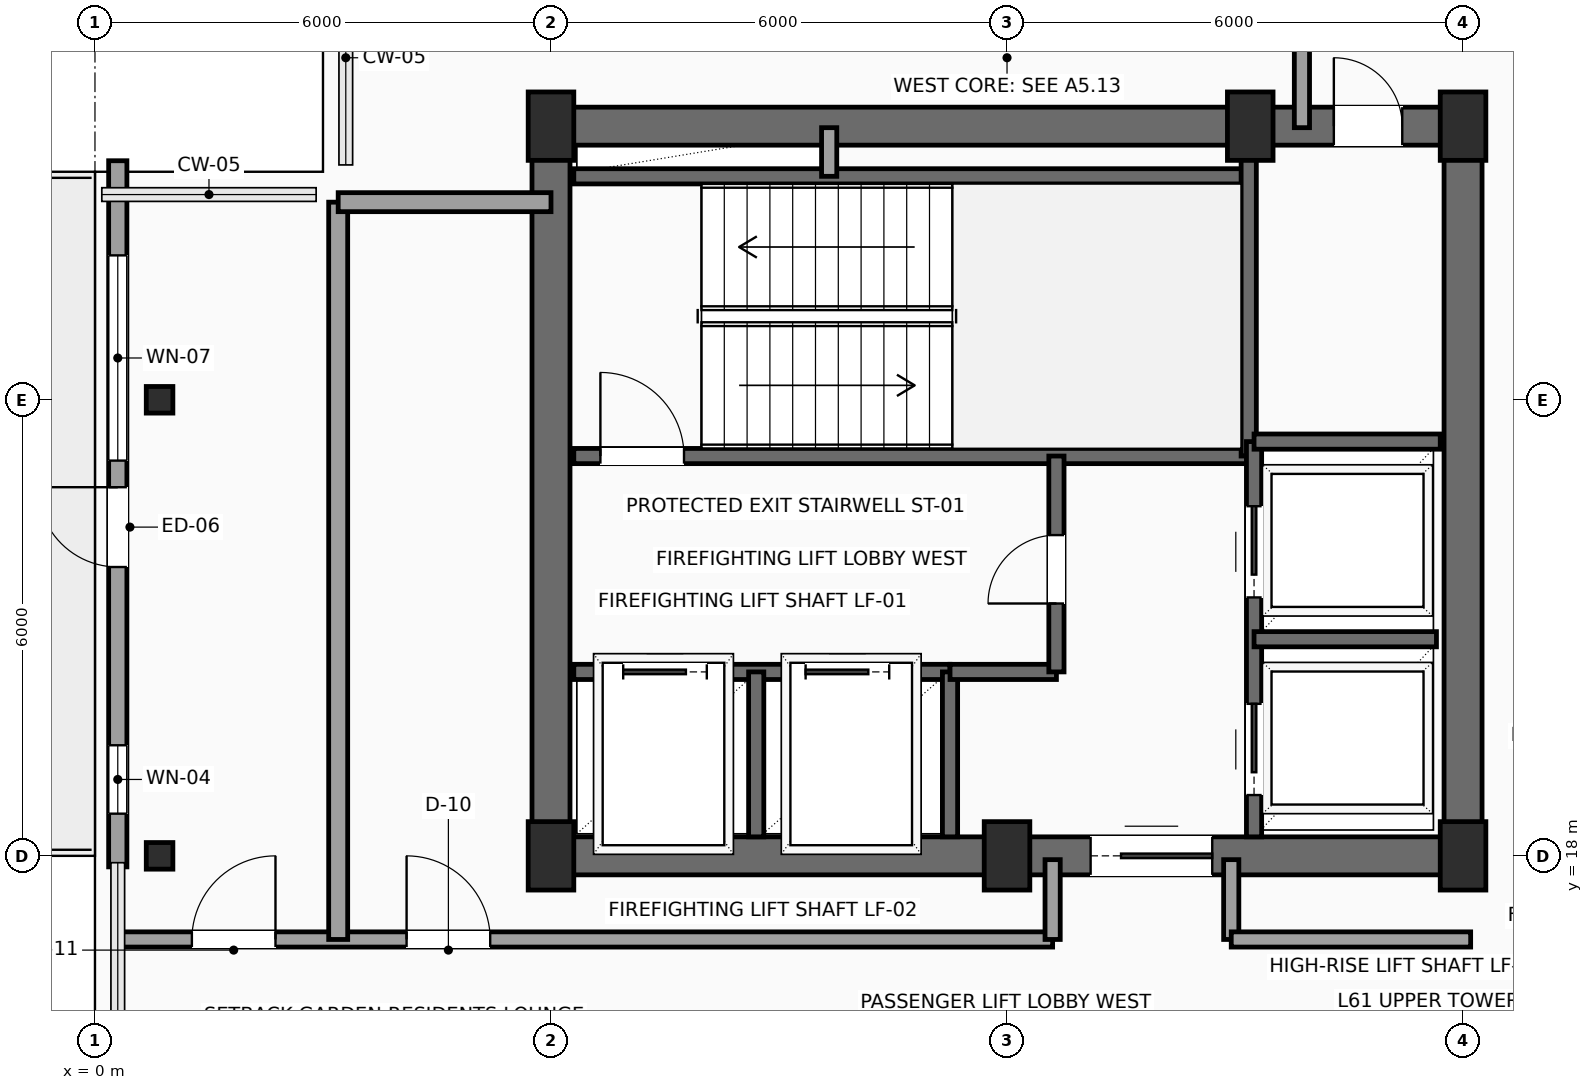
"""IFC4 building model, lengths in metres.
Left out: names, types, materials, properties, quantities, classifications, styles, units other than length and angle.
Written with IfcOpenShell. Run it as: python <this file> out.ifc"""

import sys

from ifc_helpers import new_model, si_unit, direction, frame, frame_2d, origin, origin_2d, place, context, subcontext, project, spatial, rectangle, hollow_rectangle, extrude, element, fill, save


model = new_model("IFC4")
c1 = context("Model", 3, precision=1e-05, world=origin(), true_north=direction((0.0, 1.0)))
c2 = subcontext(c1, "Body", "Model", "MODEL_VIEW")
j1 = project(units=[si_unit("LENGTHUNIT", "METRE"), si_unit("PLANEANGLEUNIT", "RADIAN")], contexts=[c1])
p1 = place(None, origin())
s1 = spatial("IfcSite", under=j1, at=p1, CompositionType="ELEMENT")
p2 = place(p1, origin())
s2 = spatial("IfcBuilding", under=s1, at=p2, CompositionType="ELEMENT")
p3 = place(p2, frame((0.0, 0.0, 246.7)))
s3 = spatial("IfcBuildingStorey", under=s2, at=p3, CompositionType="ELEMENT", Elevation=246.7)
for number, where, z_axis, x_axis in (
    (1, (6.0, 18.0, 0.0), (0.0, 0.0, 1.0), (1.0, 0.0, 0.0)),
    (2, (12.0, 18.0, 0.0), (0.0, 0.0, 1.0), (1.0, 0.0, 0.0)),
    (3, (18.0, 18.0, 0.0), (0.0, 0.0, 1.0), (1.0, 0.0, 0.0)),
    (4, (6.0, 27.6, 0.0), (0.0, 0.0, 1.0), (1.0, 0.0, 0.0)),
    (5, (15.2, 27.6, 0.0), (0.0, 0.0, 1.0), (1.0, 0.0, 0.0)),
    (6, (18.0, 27.6, 0.0), (0.0, 0.0, 1.0), (1.0, 0.0, 0.0)),
):
    element("IfcColumn", number, at=place(p3, frame(where, z_axis=z_axis, x_axis=x_axis)), inside=s3, PredefinedType="COLUMN", context=c2, shape_type="SweptSolid", body=[
        extrude(rectangle(XDim=0.6, YDim=0.9, at=origin_2d()), origin(), (0.0, 0.0, 1.0), 3.5),
    ])
for number, where, z_axis, x_axis in (
    (7, (0.85, 18.0, 0.0), (0.0, 0.0, 1.0), (1.0, 0.0, 0.0)),
    (8, (0.85, 24.0, 0.0), (0.0, 0.0, 1.0), (1.0, 0.0, 0.0)),
):
    element("IfcColumn", number, at=place(p3, frame(where, z_axis=z_axis, x_axis=x_axis)), inside=s3, PredefinedType="COLUMN", context=c2, shape_type="SweptSolid", body=[
        extrude(hollow_rectangle(XDim=0.35, YDim=0.35, WallThickness=0.016, InnerFilletRadius=0.016, OuterFilletRadius=0.032, at=origin_2d()), origin(), (0.0, 0.0, 1.0), 3.5),
    ])
p4 = place(p3, frame((0.3, 17.855, 0.0), z_axis=(0.0, 0.0, 1.0), x_axis=(0.0, 1.0, 0.0)))
e9 = element("IfcWall", 9, at=p4, inside=s3, PredefinedType="SOLIDWALL", context=c2, shape_type="SweptSolid", body=[
    extrude(rectangle(XDim=9.29, YDim=0.24, at=frame_2d((4.645, 0.0))), origin(), (0.0, 0.0, 1.0), 3.3),
])
p5 = place(p4, frame((3.945, 0.0, 0.0)))
e10 = element("IfcOpeningElement", 10, at=p5, cuts=e9, PredefinedType="OPENING", context=c2, shape_type="SweptSolid", body=[
    extrude(rectangle(XDim=1.05, YDim=2.2, at=frame_2d((0.525, 1.1))), frame((0.0, 0.13, 0.0), z_axis=(0.0, -1.0, 0.0), x_axis=(1.0, 0.0, 0.0)), (0.0, 0.0, 1.0), 0.26),
])
p6 = place(p4, frame((5.345, 0.0, 0.6)))
e11 = element("IfcOpeningElement", 11, at=p6, cuts=e9, PredefinedType="OPENING", context=c2, shape_type="SweptSolid", body=[
    extrude(rectangle(XDim=2.7, YDim=2.3, at=frame_2d((1.35, 1.15))), frame((0.0, 0.13, 0.0), z_axis=(0.0, -1.0, 0.0), x_axis=(1.0, 0.0, 0.0)), (0.0, 0.0, 1.0), 0.26),
])
p7 = place(p4, frame((0.7, 0.0, 0.6)))
e12 = element("IfcOpeningElement", 12, at=p7, cuts=e9, PredefinedType="OPENING", context=c2, shape_type="SweptSolid", body=[
    extrude(rectangle(XDim=0.9, YDim=2.2, at=frame_2d((0.45, 1.1))), frame((0.0, 0.13, 0.0), z_axis=(0.0, -1.0, 0.0), x_axis=(1.0, 0.0, 0.0)), (0.0, 0.0, 1.0), 0.26),
])
p8 = place(p3, frame((6.0, 18.0, 0.0), z_axis=(0.0, 0.0, 1.0), x_axis=(1.0, 0.0, 0.0)))
e13 = element("IfcWall", 13, at=p8, inside=s3, PredefinedType="SHEAR", context=c2, shape_type="SweptSolid", body=[
    extrude(rectangle(XDim=12.0, YDim=0.5, at=frame_2d((6.0, 0.0))), origin(), (0.0, 0.0, 1.0), 3.3),
])
p9 = place(p8, frame((7.1, 0.0, 0.0)))
e14 = element("IfcOpeningElement", 14, at=p9, cuts=e13, PredefinedType="OPENING", context=c2, shape_type="SweptSolid", body=[
    extrude(rectangle(XDim=1.6, YDim=2.3, at=frame_2d((0.8, 1.15))), frame((0.0, 0.26, 0.0), z_axis=(0.0, -1.0, 0.0), x_axis=(1.0, 0.0, 0.0)), (0.0, 0.0, 1.0), 0.52),
])
p10 = place(p3, frame((6.0, 27.6, 0.0), z_axis=(0.0, 0.0, 1.0), x_axis=(1.0, 0.0, 0.0)))
e15 = element("IfcWall", 15, at=p10, inside=s3, PredefinedType="SHEAR", context=c2, shape_type="SweptSolid", body=[
    extrude(rectangle(XDim=12.0, YDim=0.5, at=frame_2d((6.0, 0.0))), origin(), (0.0, 0.0, 1.0), 3.3),
])
p11 = place(p10, frame((10.3, 0.0, 0.0)))
e16 = element("IfcOpeningElement", 16, at=p11, cuts=e15, PredefinedType="OPENING", context=c2, shape_type="SweptSolid", body=[
    extrude(rectangle(XDim=0.9, YDim=2.15, at=frame_2d((0.45, 1.075))), frame((0.0, 0.26, 0.0), z_axis=(0.0, -1.0, 0.0), x_axis=(1.0, 0.0, 0.0)), (0.0, 0.0, 1.0), 0.52),
])
for number, where, z_axis, x_axis in (
    (17, (6.0, 18.0, 0.0), (0.0, 0.0, 1.0), (0.0, 1.0, 0.0)),
    (18, (18.0, 18.0, 0.0), (0.0, 0.0, 1.0), (0.0, 1.0, 0.0)),
):
    element("IfcWall", number, at=place(p3, frame(where, z_axis=z_axis, x_axis=x_axis)), inside=s3, PredefinedType="SHEAR", context=c2, shape_type="SweptSolid", body=[
        extrude(rectangle(XDim=9.6, YDim=0.5, at=frame_2d((4.8, 0.0))), origin(), (0.0, 0.0, 1.0), 3.3),
    ])
p12 = place(p3, frame((6.3, 23.26, 0.0), z_axis=(0.0, 0.0, 1.0), x_axis=(1.0, 0.0, 0.0)))
e19 = element("IfcWall", 19, at=p12, inside=s3, PredefinedType="SHEAR", context=c2, shape_type="SweptSolid", body=[
    extrude(rectangle(XDim=8.88, YDim=0.2, at=frame_2d((4.44, 0.0))), origin(), (0.0, 0.0, 1.0), 3.3),
])
p13 = place(p12, frame((0.35, 0.0, 0.0)))
e20 = element("IfcOpeningElement", 20, at=p13, cuts=e19, PredefinedType="OPENING", context=c2, shape_type="SweptSolid", body=[
    extrude(rectangle(XDim=1.1, YDim=2.2, at=frame_2d((0.55, 1.1))), frame((0.0, 0.11, 0.0), z_axis=(0.0, -1.0, 0.0), x_axis=(1.0, 0.0, 0.0)), (0.0, 0.0, 1.0), 0.22),
])
p14 = place(p3, frame((6.3, 26.94, 0.0), z_axis=(0.0, 0.0, 1.0), x_axis=(1.0, 0.0, 0.0)))
e21 = element("IfcWall", 21, at=p14, inside=s3, PredefinedType="SHEAR", context=c2, shape_type="SweptSolid", body=[
    extrude(rectangle(XDim=8.88, YDim=0.2, at=frame_2d((4.44, 0.0))), origin(), (0.0, 0.0, 1.0), 3.3),
])
p15 = place(p3, frame((15.18, 23.26, 0.0), z_axis=(0.0, 0.0, 1.0), x_axis=(0.0, 1.0, 0.0)))
e22 = element("IfcWall", 22, at=p15, inside=s3, PredefinedType="SHEAR", context=c2, shape_type="SweptSolid", body=[
    extrude(rectangle(XDim=4.04, YDim=0.2, at=frame_2d((2.02, 0.0))), origin(), (0.0, 0.0, 1.0), 3.3),
])
p16 = place(p3, frame((6.3, 20.42, 0.0), z_axis=(0.0, 0.0, 1.0), x_axis=(1.0, 0.0, 0.0)))
e23 = element("IfcWall", 23, at=p16, inside=s3, PredefinedType="SHEAR", context=c2, shape_type="SweptSolid", body=[
    extrude(rectangle(XDim=4.95, YDim=0.2, at=frame_2d((2.475, 0.0))), origin(), (0.0, 0.0, 1.0), 3.3),
])
p17 = place(p16, frame((0.65, 0.0, 0.0)))
e24 = element("IfcOpeningElement", 24, at=p17, cuts=e23, PredefinedType="OPENING", context=c2, shape_type="SweptSolid", body=[
    extrude(rectangle(XDim=1.1, YDim=2.2, at=frame_2d((0.55, 1.1))), frame((0.0, 0.11, 0.0), z_axis=(0.0, -1.0, 0.0), x_axis=(1.0, 0.0, 0.0)), (0.0, 0.0, 1.0), 0.22),
])
p18 = place(p16, frame((3.05, 0.0, 0.0)))
e25 = element("IfcOpeningElement", 25, at=p18, cuts=e23, PredefinedType="OPENING", context=c2, shape_type="SweptSolid", body=[
    extrude(rectangle(XDim=1.1, YDim=2.2, at=frame_2d((0.55, 1.1))), frame((0.0, 0.11, 0.0), z_axis=(0.0, -1.0, 0.0), x_axis=(1.0, 0.0, 0.0)), (0.0, 0.0, 1.0), 0.22),
])
for number, where, z_axis, x_axis in (
    (26, (8.7, 18.25, 0.0), (0.0, 0.0, 1.0), (0.0, 1.0, 0.0)),
    (27, (11.25, 18.25, 0.0), (0.0, 0.0, 1.0), (0.0, 1.0, 0.0)),
):
    element("IfcWall", number, at=place(p3, frame(where, z_axis=z_axis, x_axis=x_axis)), inside=s3, PredefinedType="SHEAR", context=c2, shape_type="SweptSolid", body=[
        extrude(rectangle(XDim=2.17, YDim=0.2, at=frame_2d((1.085, 0.0))), origin(), (0.0, 0.0, 1.0), 3.3),
    ])
p19 = place(p3, frame((11.25, 20.42, 0.0), z_axis=(0.0, 0.0, 1.0), x_axis=(1.0, 0.0, 0.0)))
e28 = element("IfcWall", 28, at=p19, inside=s3, PredefinedType="SHEAR", context=c2, shape_type="SweptSolid", body=[
    extrude(rectangle(XDim=1.4, YDim=0.2, at=frame_2d((0.7, 0.0))), origin(), (0.0, 0.0, 1.0), 3.3),
])
p20 = place(p3, frame((12.65, 20.42, 0.0), z_axis=(0.0, 0.0, 1.0), x_axis=(0.0, 1.0, 0.0)))
e29 = element("IfcWall", 29, at=p20, inside=s3, PredefinedType="SHEAR", context=c2, shape_type="SweptSolid", body=[
    extrude(rectangle(XDim=2.84, YDim=0.2, at=frame_2d((1.42, 0.0))), origin(), (0.0, 0.0, 1.0), 3.3),
])
p21 = place(p20, frame((0.9, 0.0, 0.0)))
e30 = element("IfcOpeningElement", 30, at=p21, cuts=e29, PredefinedType="OPENING", context=c2, shape_type="SweptSolid", body=[
    extrude(rectangle(XDim=0.9, YDim=2.15, at=frame_2d((0.45, 1.075))), frame((0.0, 0.11, 0.0), z_axis=(0.0, -1.0, 0.0), x_axis=(1.0, 0.0, 0.0)), (0.0, 0.0, 1.0), 0.22),
])
p22 = place(p3, frame((9.66, 26.94, 0.0), z_axis=(0.0, 0.0, 1.0), x_axis=(0.0, 1.0, 0.0)))
e31 = element("IfcWall", 31, at=p22, inside=s3, PredefinedType="SOLIDWALL", context=c2, shape_type="SweptSolid", body=[
    extrude(rectangle(XDim=0.64, YDim=0.2, at=frame_2d((0.32, 0.0))), origin(), (0.0, 0.0, 1.0), 3.3),
])
p23 = place(p3, frame((15.25, 18.25, 0.0), z_axis=(0.0, 0.0, 1.0), x_axis=(0.0, 1.0, 0.0)))
e32 = element("IfcWall", 32, at=p23, inside=s3, PredefinedType="SHEAR", context=c2, shape_type="SweptSolid", body=[
    extrude(rectangle(XDim=5.2, YDim=0.2, at=frame_2d((2.6, 0.0))), origin(), (0.0, 0.0, 1.0), 3.3),
])
p24 = place(p23, frame((0.55, 0.0, 0.0)))
e33 = element("IfcOpeningElement", 33, at=p24, cuts=e32, PredefinedType="OPENING", context=c2, shape_type="SweptSolid", body=[
    extrude(rectangle(XDim=1.2, YDim=2.2, at=frame_2d((0.6, 1.1))), frame((0.0, 0.11, 0.0), z_axis=(0.0, -1.0, 0.0), x_axis=(1.0, 0.0, 0.0)), (0.0, 0.0, 1.0), 0.22),
])
p25 = place(p23, frame((3.15, 0.0, 0.0)))
e34 = element("IfcOpeningElement", 34, at=p25, cuts=e32, PredefinedType="OPENING", context=c2, shape_type="SweptSolid", body=[
    extrude(rectangle(XDim=1.2, YDim=2.2, at=frame_2d((0.6, 1.1))), frame((0.0, 0.11, 0.0), z_axis=(0.0, -1.0, 0.0), x_axis=(1.0, 0.0, 0.0)), (0.0, 0.0, 1.0), 0.22),
])
p26 = place(p3, frame((15.25, 20.85, 0.0), z_axis=(0.0, 0.0, 1.0), x_axis=(1.0, 0.0, 0.0)))
e35 = element("IfcWall", 35, at=p26, inside=s3, PredefinedType="SHEAR", context=c2, shape_type="SweptSolid", body=[
    extrude(rectangle(XDim=2.4, YDim=0.2, at=frame_2d((1.2, 0.0))), origin(), (0.0, 0.0, 1.0), 3.3),
])
p27 = place(p3, frame((15.25, 23.45, 0.0), z_axis=(0.0, 0.0, 1.0), x_axis=(1.0, 0.0, 0.0)))
e36 = element("IfcWall", 36, at=p27, inside=s3, PredefinedType="SHEAR", context=c2, shape_type="SweptSolid", body=[
    extrude(rectangle(XDim=2.45, YDim=0.2, at=frame_2d((1.225, 0.0))), origin(), (0.0, 0.0, 1.0), 3.3),
])
p28 = place(p3, frame((0.3, 16.9, 0.0), z_axis=(0.0, 0.0, 1.0), x_axis=(1.0, 0.0, 0.0)))
e37 = element("IfcWall", 37, at=p28, inside=s3, PredefinedType="PARTITIONING", context=c2, shape_type="SweptSolid", body=[
    extrude(rectangle(XDim=12.3, YDim=0.2, at=frame_2d((6.15, 0.0))), origin(), (0.0, 0.0, 1.0), 3.3),
])
p29 = place(p28, frame((0.975, 0.0, 0.0)))
e38 = element("IfcOpeningElement", 38, at=p29, cuts=e37, PredefinedType="OPENING", context=c2, shape_type="SweptSolid", body=[
    extrude(rectangle(XDim=1.1, YDim=2.25, at=frame_2d((0.55, 1.125))), frame((0.0, 0.11, 0.0), z_axis=(0.0, -1.0, 0.0), x_axis=(1.0, 0.0, 0.0)), (0.0, 0.0, 1.0), 0.22),
])
p30 = place(p28, frame((3.8, 0.0, 0.0)))
e39 = element("IfcOpeningElement", 39, at=p30, cuts=e37, PredefinedType="OPENING", context=c2, shape_type="SweptSolid", body=[
    extrude(rectangle(XDim=1.1, YDim=2.25, at=frame_2d((0.55, 1.125))), frame((0.0, 0.11, 0.0), z_axis=(0.0, -1.0, 0.0), x_axis=(1.0, 0.0, 0.0)), (0.0, 0.0, 1.0), 0.22),
])
for number, where, z_axis, x_axis in (
    (40, (12.6, 16.9, 0.0), (0.0, 0.0, 1.0), (0.0, 1.0, 0.0)),
    (41, (14.95, 17.95, 0.0), (0.0, 0.0, 1.0), (0.0, -1.0, 0.0)),
):
    element("IfcWall", number, at=place(p3, frame(where, z_axis=z_axis, x_axis=x_axis)), inside=s3, PredefinedType="PARTITIONING", context=c2, shape_type="SweptSolid", body=[
        extrude(rectangle(XDim=1.05, YDim=0.2, at=frame_2d((0.525, 0.0))), origin(), (0.0, 0.0, 1.0), 3.3),
    ])
p31 = place(p3, frame((14.95, 16.9, 0.0), z_axis=(0.0, 0.0, 1.0), x_axis=(1.0, 0.0, 0.0)))
e42 = element("IfcWall", 42, at=p31, inside=s3, PredefinedType="PARTITIONING", context=c2, shape_type="SweptSolid", body=[
    extrude(rectangle(XDim=3.15, YDim=0.2, at=frame_2d((1.575, 0.0))), origin(), (0.0, 0.0, 1.0), 3.3),
])
p32 = place(p3, frame((15.88, 27.58, 0.0), z_axis=(0.0, 0.0, 1.0), x_axis=(0.0, 1.0, 0.0)))
e43 = element("IfcWall", 43, at=p32, inside=s3, PredefinedType="PARTITIONING", context=c2, shape_type="SweptSolid", body=[
    extrude(rectangle(XDim=2.12, YDim=0.2, at=frame_2d((1.06, 0.0))), origin(), (0.0, 0.0, 1.0), 3.3),
])
p33 = place(p3, frame((3.2, 16.9, 0.0), z_axis=(0.0, 0.0, 1.0), x_axis=(0.0, 1.0, 0.0)))
e44 = element("IfcWall", 44, at=p33, inside=s3, PredefinedType="PARTITIONING", context=c2, shape_type="SweptSolid", body=[
    extrude(rectangle(XDim=9.7, YDim=0.25, at=frame_2d((4.85, 0.0))), origin(), (0.0, 0.0, 1.0), 3.3),
])
p34 = place(p3, frame((3.2, 26.6, 0.0), z_axis=(0.0, 0.0, 1.0), x_axis=(1.0, 0.0, 0.0)))
e45 = element("IfcWall", 45, at=p34, inside=s3, PredefinedType="PARTITIONING", context=c2, shape_type="SweptSolid", body=[
    extrude(rectangle(XDim=2.8, YDim=0.25, at=frame_2d((1.4, 0.0))), origin(), (0.0, 0.0, 1.0), 3.3),
])
p35 = place(p5, origin())
e46 = element("IfcDoor", 46, at=p35, inside=s3, OperationType="SINGLE_SWING_RIGHT", PredefinedType="DOOR", context=c2, shape_type="SweptSolid", body=[
    extrude(rectangle(XDim=1.05, YDim=2.2, at=frame_2d((0.525, 1.1))), frame((0.0, 0.025, 0.0), z_axis=(0.0, -1.0, 0.0), x_axis=(1.0, 0.0, 0.0)), (0.0, 0.0, 1.0), 0.05),
])
fill(e10, e46)
p36 = place(p6, origin())
e47 = element("IfcWindow", 47, at=p36, inside=s3, PartitioningType="SINGLE_PANEL", PredefinedType="WINDOW", context=c2, shape_type="SweptSolid", body=[
    extrude(rectangle(XDim=2.7, YDim=2.3, at=frame_2d((1.35, 1.15))), frame((0.0, 0.03, 0.0), z_axis=(0.0, -1.0, 0.0), x_axis=(1.0, 0.0, 0.0)), (0.0, 0.0, 1.0), 0.06),
])
fill(e11, e47)
p37 = place(p7, origin())
e48 = element("IfcWindow", 48, at=p37, inside=s3, PartitioningType="SINGLE_PANEL", PredefinedType="WINDOW", context=c2, shape_type="SweptSolid", body=[
    extrude(rectangle(XDim=0.9, YDim=2.2, at=frame_2d((0.45, 1.1))), frame((0.0, 0.03, 0.0), z_axis=(0.0, -1.0, 0.0), x_axis=(1.0, 0.0, 0.0)), (0.0, 0.0, 1.0), 0.06),
])
fill(e12, e48)
p38 = place(p9, origin())
e49 = element("IfcDoor", 49, at=p38, inside=s3, OperationType="DOUBLE_DOOR_SLIDING", PredefinedType="DOOR", context=c2, shape_type="SweptSolid", body=[
    extrude(rectangle(XDim=1.6, YDim=2.3, at=frame_2d((0.8, 1.15))), frame((0.0, 0.025, 0.0), z_axis=(0.0, -1.0, 0.0), x_axis=(1.0, 0.0, 0.0)), (0.0, 0.0, 1.0), 0.05),
])
fill(e14, e49)
p39 = place(p11, origin())
e50 = element("IfcDoor", 50, at=p39, inside=s3, OperationType="SINGLE_SWING_LEFT", PredefinedType="DOOR", context=c2, shape_type="SweptSolid", body=[
    extrude(rectangle(XDim=0.9, YDim=2.15, at=frame_2d((0.45, 1.075))), frame((0.0, 0.025, 0.0), z_axis=(0.0, -1.0, 0.0), x_axis=(1.0, 0.0, 0.0)), (0.0, 0.0, 1.0), 0.05),
])
fill(e16, e50)
p40 = place(p13, origin())
e51 = element("IfcDoor", 51, at=p40, inside=s3, OperationType="SINGLE_SWING_LEFT", PredefinedType="DOOR", context=c2, shape_type="SweptSolid", body=[
    extrude(rectangle(XDim=1.1, YDim=2.2, at=frame_2d((0.55, 1.1))), frame((0.0, 0.025, 0.0), z_axis=(0.0, -1.0, 0.0), x_axis=(1.0, 0.0, 0.0)), (0.0, 0.0, 1.0), 0.05),
])
fill(e20, e51)
p41 = place(p17, origin())
e52 = element("IfcDoor", 52, at=p41, inside=s3, OperationType="SLIDING_TO_LEFT", PredefinedType="DOOR", context=c2, shape_type="SweptSolid", body=[
    extrude(rectangle(XDim=1.1, YDim=2.2, at=frame_2d((0.55, 1.1))), frame((0.0, 0.025, 0.0), z_axis=(0.0, -1.0, 0.0), x_axis=(1.0, 0.0, 0.0)), (0.0, 0.0, 1.0), 0.05),
])
fill(e24, e52)
p42 = place(p18, origin())
e53 = element("IfcDoor", 53, at=p42, inside=s3, OperationType="SLIDING_TO_LEFT", PredefinedType="DOOR", context=c2, shape_type="SweptSolid", body=[
    extrude(rectangle(XDim=1.1, YDim=2.2, at=frame_2d((0.55, 1.1))), frame((0.0, 0.025, 0.0), z_axis=(0.0, -1.0, 0.0), x_axis=(1.0, 0.0, 0.0)), (0.0, 0.0, 1.0), 0.05),
])
fill(e25, e53)
p43 = place(p21, origin())
e54 = element("IfcDoor", 54, at=p43, inside=s3, OperationType="SINGLE_SWING_LEFT", PredefinedType="DOOR", context=c2, shape_type="SweptSolid", body=[
    extrude(rectangle(XDim=0.9, YDim=2.15, at=frame_2d((0.45, 1.075))), frame((0.0, 0.025, 0.0), z_axis=(0.0, -1.0, 0.0), x_axis=(1.0, 0.0, 0.0)), (0.0, 0.0, 1.0), 0.05),
])
fill(e30, e54)
p44 = place(p24, origin())
e55 = element("IfcDoor", 55, at=p44, inside=s3, OperationType="SLIDING_TO_RIGHT", PredefinedType="DOOR", context=c2, shape_type="SweptSolid", body=[
    extrude(rectangle(XDim=1.2, YDim=2.2, at=frame_2d((0.6, 1.1))), frame((0.0, 0.025, 0.0), z_axis=(0.0, -1.0, 0.0), x_axis=(1.0, 0.0, 0.0)), (0.0, 0.0, 1.0), 0.05),
])
fill(e33, e55)
p45 = place(p25, origin())
e56 = element("IfcDoor", 56, at=p45, inside=s3, OperationType="SLIDING_TO_RIGHT", PredefinedType="DOOR", context=c2, shape_type="SweptSolid", body=[
    extrude(rectangle(XDim=1.2, YDim=2.2, at=frame_2d((0.6, 1.1))), frame((0.0, 0.025, 0.0), z_axis=(0.0, -1.0, 0.0), x_axis=(1.0, 0.0, 0.0)), (0.0, 0.0, 1.0), 0.05),
])
fill(e34, e56)
p46 = place(p29, origin())
e57 = element("IfcDoor", 57, at=p46, inside=s3, OperationType="SINGLE_SWING_RIGHT", PredefinedType="DOOR", context=c2, shape_type="SweptSolid", body=[
    extrude(rectangle(XDim=1.1, YDim=2.25, at=frame_2d((0.55, 1.125))), frame((0.0, 0.025, 0.0), z_axis=(0.0, -1.0, 0.0), x_axis=(1.0, 0.0, 0.0)), (0.0, 0.0, 1.0), 0.05),
])
fill(e38, e57)
p47 = place(p30, origin())
e58 = element("IfcDoor", 58, at=p47, inside=s3, OperationType="SINGLE_SWING_LEFT", PredefinedType="DOOR", context=c2, shape_type="SweptSolid", body=[
    extrude(rectangle(XDim=1.1, YDim=2.25, at=frame_2d((0.55, 1.125))), frame((0.0, 0.025, 0.0), z_axis=(0.0, -1.0, 0.0), x_axis=(1.0, 0.0, 0.0)), (0.0, 0.0, 1.0), 0.05),
])
fill(e39, e58)
save(model, sys.argv[1])
